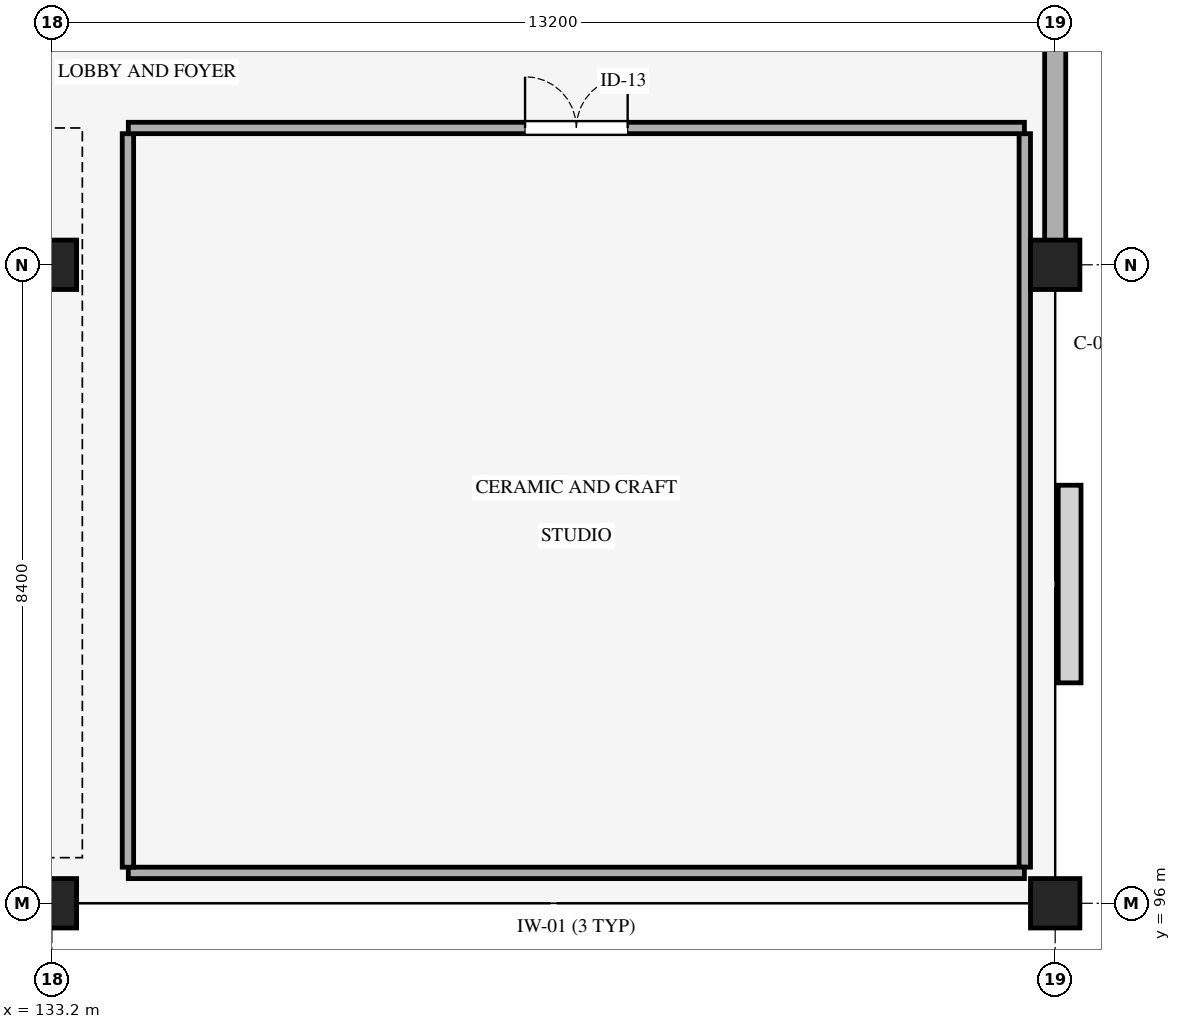
"""IFC4 building model, lengths in metres.
Left out: names, types, materials, properties, quantities, classifications, styles, units other than length and angle.
Written with IfcOpenShell. Run it as: python <this file> out.ifc"""

import sys

from ifc_helpers import new_model, si_unit, direction, frame, frame_2d, origin, origin_2d, place, context, subcontext, project, spatial, rectangle, extrude, element, fill, save


model = new_model("IFC4")
c1 = context("Model", 3, precision=1e-05, world=origin(), true_north=direction((0.0, 1.0)))
c2 = subcontext(c1, "Body", "Model", "MODEL_VIEW")
j1 = project(units=[si_unit("LENGTHUNIT", "METRE"), si_unit("PLANEANGLEUNIT", "RADIAN")], contexts=[c1])
p1 = place(None, origin())
s1 = spatial("IfcSite", under=j1, at=p1, CompositionType="ELEMENT")
p2 = place(p1, origin())
s2 = spatial("IfcBuilding", under=s1, at=p2, CompositionType="ELEMENT")
p3 = place(p2, frame((0.0, 0.0, 13.5)))
s3 = spatial("IfcBuildingStorey", under=s2, at=p3, CompositionType="ELEMENT", Elevation=13.5)
for number, where, z_axis, x_axis in (
    (1, (133.2, 96.0, 0.0), (0.0, 0.0, 1.0), (1.0, 0.0, 0.0)),
    (2, (133.2, 104.4, 0.0), (0.0, 0.0, 1.0), (1.0, 0.0, 0.0)),
    (3, (146.4, 96.0, 0.0), (0.0, 0.0, 1.0), (1.0, 0.0, 0.0)),
    (4, (146.4, 104.4, 0.0), (0.0, 0.0, 1.0), (1.0, 0.0, 0.0)),
):
    element("IfcColumn", number, at=place(p3, frame(where, z_axis=z_axis, x_axis=x_axis)), inside=s3, PredefinedType="COLUMN", context=c2, shape_type="SweptSolid", body=[
        extrude(rectangle(XDim=0.65, YDim=0.65, at=origin_2d()), origin(), (0.0, 0.0, 1.0), 3.9),
    ])
p4 = place(p3, frame((146.4, 111.6, 0.0), z_axis=(0.0, 0.0, 1.0), x_axis=(0.0, -1.0, 0.0)))
e5 = element("IfcWall", 5, at=p4, inside=s3, PredefinedType="STANDARD", context=c2, shape_type="SweptSolid", body=[
    extrude(rectangle(XDim=7.2, YDim=0.278, at=frame_2d((3.6, 0.0))), origin(), (0.0, 0.0, 1.0), 2.905),
])
p5 = place(p3, frame((133.2, 96.0, 0.0), z_axis=(0.0, 0.0, 1.0), x_axis=(-1.0, 0.0, 0.0)))
e6 = element("IfcWall", 6, at=p5, inside=s3, PredefinedType="STANDARD", context=c2, shape_type="SweptSolid", body=[
    extrude(rectangle(XDim=9.6, YDim=0.278, at=frame_2d((4.8, 0.0))), origin(), (0.0, 0.0, 1.0), 2.855),
])
p6 = place(p5, frame((2.072, 0.0, 1.1)))
e7 = element("IfcOpeningElement", 7, at=p6, cuts=e6, PredefinedType="OPENING", context=c2, shape_type="SweptSolid", body=[
    extrude(rectangle(XDim=2.0, YDim=1.4, at=frame_2d((1.0, 0.7))), frame((0.0, 0.149, 0.0), z_axis=(0.0, -1.0, 0.0), x_axis=(1.0, 0.0, 0.0)), (0.0, 0.0, 1.0), 0.298),
])
p7 = place(p5, frame((5.528, 0.0, 1.1)))
e8 = element("IfcOpeningElement", 8, at=p7, cuts=e6, PredefinedType="OPENING", context=c2, shape_type="SweptSolid", body=[
    extrude(rectangle(XDim=2.0, YDim=1.4, at=frame_2d((1.0, 0.7))), frame((0.0, 0.149, 0.0), z_axis=(0.0, -1.0, 0.0), x_axis=(1.0, 0.0, 0.0)), (0.0, 0.0, 1.0), 0.298),
])
p8 = place(p3, frame((146.0, 106.125, 0.0), z_axis=(0.0, 0.0, 1.0), x_axis=(0.0, -1.0, 0.0)))
e9 = element("IfcWall", 9, at=p8, inside=s3, PredefinedType="STANDARD", context=c2, shape_type="SweptSolid", body=[
    extrude(rectangle(XDim=9.65, YDim=0.15, at=frame_2d((4.825, 0.0))), origin(), (0.0, 0.0, 1.0), 2.905),
])
p9 = place(p3, frame((145.995, 96.4, 0.0), z_axis=(0.0, 0.0, 1.0), x_axis=(-1.0, 0.0, 0.0)))
e10 = element("IfcWall", 10, at=p9, inside=s3, PredefinedType="STANDARD", context=c2, shape_type="SweptSolid", body=[
    extrude(rectangle(XDim=11.79, YDim=0.15, at=frame_2d((5.895, 0.0))), origin(), (0.0, 0.0, 1.0), 2.905),
])
p10 = place(p3, frame((134.2, 96.475, 0.0), z_axis=(0.0, 0.0, 1.0), x_axis=(0.0, 1.0, 0.0)))
e11 = element("IfcWall", 11, at=p10, inside=s3, PredefinedType="STANDARD", context=c2, shape_type="SweptSolid", body=[
    extrude(rectangle(XDim=9.65, YDim=0.15, at=frame_2d((4.825, 0.0))), origin(), (0.0, 0.0, 1.0), 3.66),
])
p11 = place(p3, frame((134.205, 106.2, 0.0), z_axis=(0.0, 0.0, 1.0), x_axis=(1.0, 0.0, 0.0)))
e12 = element("IfcWall", 12, at=p11, inside=s3, PredefinedType="STANDARD", context=c2, shape_type="SweptSolid", body=[
    extrude(rectangle(XDim=11.79, YDim=0.15, at=frame_2d((5.895, 0.0))), origin(), (0.0, 0.0, 1.0), 3.66),
])
p12 = place(p11, frame((5.22, 0.0, 0.0)))
e13 = element("IfcOpeningElement", 13, at=p12, cuts=e12, PredefinedType="OPENING", context=c2, shape_type="SweptSolid", body=[
    extrude(rectangle(XDim=1.35, YDim=2.2, at=frame_2d((0.675, 1.1))), frame((0.0, 0.085, 0.0), z_axis=(0.0, -1.0, 0.0), x_axis=(1.0, 0.0, 0.0)), (0.0, 0.0, 1.0), 0.17),
])
p13 = place(p12, origin())
e14 = element("IfcDoor", 14, at=p13, inside=s3, OperationType="DOUBLE_DOOR_SINGLE_SWING", PredefinedType="DOOR", context=c2, shape_type="SweptSolid", body=[
    extrude(rectangle(XDim=1.35, YDim=2.2, at=frame_2d((0.675, 1.1))), frame((0.0, 0.025, 0.0), z_axis=(0.0, -1.0, 0.0), x_axis=(1.0, 0.0, 0.0)), (0.0, 0.0, 1.0), 0.05),
])
fill(e13, e14)
save(model, sys.argv[1])
